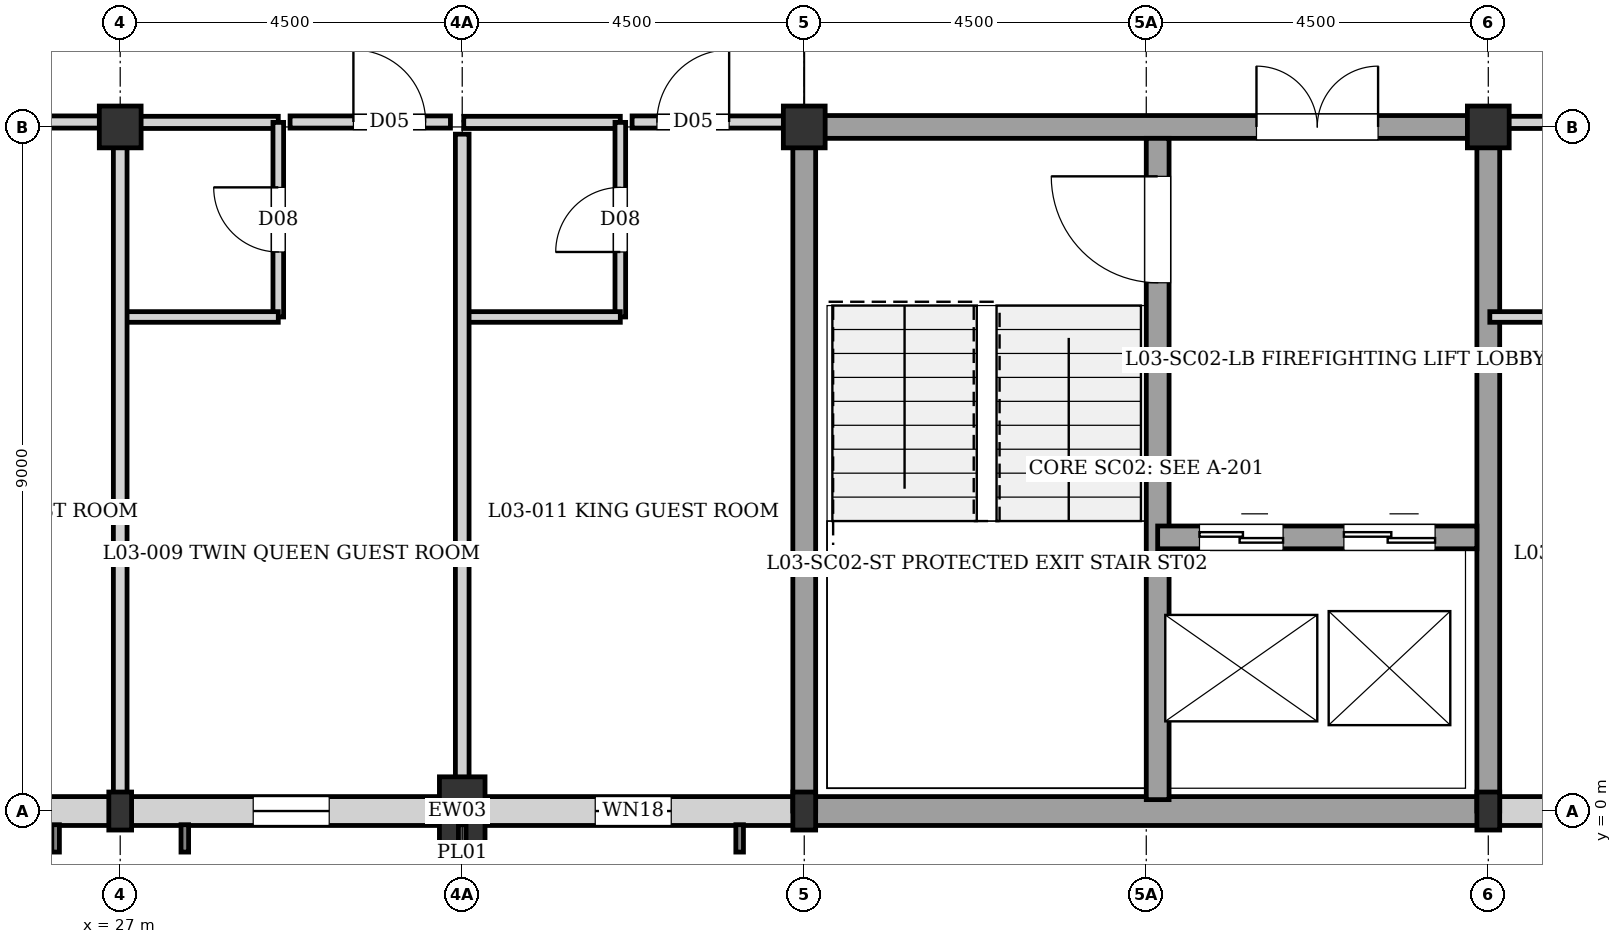
"""IFC4 building model, lengths in metres.
Left out: names, types, materials, properties, quantities, classifications, styles, units other than length and angle.
Written with IfcOpenShell. Run it as: python <this file> out.ifc"""

import sys

from ifc_helpers import new_model, si_unit, direction, frame, frame_2d, origin, origin_2d, place, context, subcontext, project, spatial, rectangle, i_section, extrude, element, fill, save


model = new_model("IFC4")
c1 = context("Model", 3, precision=1e-05, world=origin(), true_north=direction((0.0, 1.0)))
c2 = subcontext(c1, "Body", "Model", "MODEL_VIEW")
j1 = project(units=[si_unit("LENGTHUNIT", "METRE"), si_unit("PLANEANGLEUNIT", "RADIAN")], contexts=[c1])
p1 = place(None, origin())
s1 = spatial("IfcSite", under=j1, at=p1, CompositionType="ELEMENT")
p2 = place(p1, origin())
s2 = spatial("IfcBuilding", under=s1, at=p2, CompositionType="ELEMENT")
p3 = place(p2, frame((0.0, 0.0, 11.52)))
s3 = spatial("IfcBuildingStorey", under=s2, at=p3, CompositionType="ELEMENT", Elevation=11.52)
p4 = place(p3, frame((27.0, 0.0, 0.0), z_axis=(0.0, 0.0, 1.0), x_axis=(1.0, 0.0, 0.0)))
e1 = element("IfcColumn", 1, at=p4, inside=s3, PredefinedType="COLUMN", context=c2, shape_type="SweptSolid", body=[
    extrude(i_section(OverallWidth=0.3, OverallDepth=0.5, WebThickness=0.014, FlangeThickness=0.028, at=origin_2d()), origin(), (0.0, 0.0, 1.0), 3.04),
])
p5 = place(p3, frame((27.0, 9.0, 0.0), z_axis=(0.0, 0.0, 1.0), x_axis=(1.0, 0.0, 0.0)))
e2 = element("IfcColumn", 2, at=p5, inside=s3, PredefinedType="COLUMN", context=c2, shape_type="SweptSolid", body=[
    extrude(rectangle(XDim=0.55, YDim=0.55, at=origin_2d()), origin(), (0.0, 0.0, 1.0), 3.04),
])
p6 = place(p3, frame((36.0, 0.0, 0.0), z_axis=(0.0, 0.0, 1.0), x_axis=(1.0, 0.0, 0.0)))
e3 = element("IfcColumn", 3, at=p6, inside=s3, PredefinedType="COLUMN", context=c2, shape_type="SweptSolid", body=[
    extrude(i_section(OverallWidth=0.3, OverallDepth=0.5, WebThickness=0.014, FlangeThickness=0.028, at=origin_2d()), origin(), (0.0, 0.0, 1.0), 3.04),
])
p7 = place(p3, frame((36.0, 9.0, 0.0), z_axis=(0.0, 0.0, 1.0), x_axis=(1.0, 0.0, 0.0)))
e4 = element("IfcColumn", 4, at=p7, inside=s3, PredefinedType="COLUMN", context=c2, shape_type="SweptSolid", body=[
    extrude(rectangle(XDim=0.55, YDim=0.55, at=origin_2d()), origin(), (0.0, 0.0, 1.0), 3.04),
])
p8 = place(p3, frame((45.0, 0.0, 0.0), z_axis=(0.0, 0.0, 1.0), x_axis=(1.0, 0.0, 0.0)))
e5 = element("IfcColumn", 5, at=p8, inside=s3, PredefinedType="COLUMN", context=c2, shape_type="SweptSolid", body=[
    extrude(i_section(OverallWidth=0.3, OverallDepth=0.5, WebThickness=0.014, FlangeThickness=0.028, at=origin_2d()), origin(), (0.0, 0.0, 1.0), 3.04),
])
p9 = place(p3, frame((45.0, 9.0, 0.0), z_axis=(0.0, 0.0, 1.0), x_axis=(1.0, 0.0, 0.0)))
e6 = element("IfcColumn", 6, at=p9, inside=s3, PredefinedType="COLUMN", context=c2, shape_type="SweptSolid", body=[
    extrude(rectangle(XDim=0.55, YDim=0.55, at=origin_2d()), origin(), (0.0, 0.0, 1.0), 3.04),
])
p10 = place(p3, frame((31.5, 0.0, 0.0), z_axis=(0.0, 0.0, 1.0), x_axis=(1.0, 0.0, 0.0)))
e7 = element("IfcColumn", 7, at=p10, inside=s3, PredefinedType="PILASTER", context=c2, shape_type="SweptSolid", body=[
    extrude(rectangle(XDim=0.6, YDim=0.9, at=origin_2d()), origin(), (0.0, 0.0, 1.0), 3.04),
])
p11 = place(p3, frame((53.87, 0.0, 0.0), z_axis=(0.0, 0.0, 1.0), x_axis=(-1.0, 0.0, 0.0)))
e8 = element("IfcWall", 8, at=p11, inside=s3, PredefinedType="SOLIDWALL", context=c2, shape_type="SweptSolid", body=[
    extrude(rectangle(XDim=8.74, YDim=0.38, at=frame_2d((4.37, 0.0))), origin(), (0.0, 0.0, 1.0), 2.42),
])
p12 = place(p11, frame((1.62, 0.0, 0.35)))
e9 = element("IfcOpeningElement", 9, at=p12, cuts=e8, PredefinedType="OPENING", context=c2, shape_type="SweptSolid", body=[
    extrude(rectangle(XDim=1.0, YDim=1.6, at=frame_2d((0.5, 0.8))), frame((0.0, 0.2, 0.0), z_axis=(0.0, -1.0, 0.0), x_axis=(1.0, 0.0, 0.0)), (0.0, 0.0, 1.0), 0.4),
])
p13 = place(p11, frame((6.12, 0.0, 0.35)))
e10 = element("IfcOpeningElement", 10, at=p13, cuts=e8, PredefinedType="OPENING", context=c2, shape_type="SweptSolid", body=[
    extrude(rectangle(XDim=1.0, YDim=1.6, at=frame_2d((0.5, 0.8))), frame((0.0, 0.2, 0.0), z_axis=(0.0, -1.0, 0.0), x_axis=(1.0, 0.0, 0.0)), (0.0, 0.0, 1.0), 0.4),
])
p14 = place(p3, frame((45.0, 0.0, 0.0), z_axis=(0.0, 0.0, 1.0), x_axis=(-1.0, 0.0, 0.0)))
e11 = element("IfcWall", 11, at=p14, inside=s3, PredefinedType="SOLIDWALL", context=c2, shape_type="SweptSolid", body=[
    extrude(rectangle(XDim=9.0, YDim=0.38, at=frame_2d((4.5, 0.0))), origin(), (0.0, 0.0, 1.0), 2.82),
])
p15 = place(p3, frame((35.87, 0.0, 0.0), z_axis=(0.0, 0.0, 1.0), x_axis=(-1.0, 0.0, 0.0)))
e12 = element("IfcWall", 12, at=p15, inside=s3, PredefinedType="SOLIDWALL", context=c2, shape_type="SweptSolid", body=[
    extrude(rectangle(XDim=8.87, YDim=0.38, at=frame_2d((4.435, 0.0))), origin(), (0.0, 0.0, 1.0), 2.55),
])
p16 = place(p15, frame((1.62, 0.0, 0.35)))
e13 = element("IfcOpeningElement", 13, at=p16, cuts=e12, PredefinedType="OPENING", context=c2, shape_type="SweptSolid", body=[
    extrude(rectangle(XDim=1.0, YDim=1.6, at=frame_2d((0.5, 0.8))), frame((0.0, 0.2, 0.0), z_axis=(0.0, -1.0, 0.0), x_axis=(1.0, 0.0, 0.0)), (0.0, 0.0, 1.0), 0.4),
])
p17 = place(p15, frame((6.12, 0.0, 0.35)))
e14 = element("IfcOpeningElement", 14, at=p17, cuts=e12, PredefinedType="OPENING", context=c2, shape_type="SweptSolid", body=[
    extrude(rectangle(XDim=1.0, YDim=1.6, at=frame_2d((0.5, 0.8))), frame((0.0, 0.2, 0.0), z_axis=(0.0, -1.0, 0.0), x_axis=(1.0, 0.0, 0.0)), (0.0, 0.0, 1.0), 0.4),
])
p18 = place(p3, frame((27.0, 0.0, 0.0), z_axis=(0.0, 0.0, 1.0), x_axis=(-1.0, 0.0, 0.0)))
e15 = element("IfcWall", 15, at=p18, inside=s3, PredefinedType="SOLIDWALL", context=c2, shape_type="SweptSolid", body=[
    extrude(rectangle(XDim=8.87, YDim=0.38, at=frame_2d((4.435, 0.0))), origin(), (0.0, 0.0, 1.0), 2.38),
])
p19 = place(p18, frame((1.75, 0.0, 0.35)))
e16 = element("IfcOpeningElement", 16, at=p19, cuts=e15, PredefinedType="OPENING", context=c2, shape_type="SweptSolid", body=[
    extrude(rectangle(XDim=1.0, YDim=1.6, at=frame_2d((0.5, 0.8))), frame((0.0, 0.2, 0.0), z_axis=(0.0, -1.0, 0.0), x_axis=(1.0, 0.0, 0.0)), (0.0, 0.0, 1.0), 0.4),
])
p20 = place(p18, frame((6.25, 0.0, 0.35)))
e17 = element("IfcOpeningElement", 17, at=p20, cuts=e15, PredefinedType="OPENING", context=c2, shape_type="SweptSolid", body=[
    extrude(rectangle(XDim=1.0, YDim=1.6, at=frame_2d((0.5, 0.8))), frame((0.0, 0.2, 0.0), z_axis=(0.0, -1.0, 0.0), x_axis=(1.0, 0.0, 0.0)), (0.0, 0.0, 1.0), 0.4),
])
p21 = place(p3, frame((45.0, 0.0, 0.0), z_axis=(0.0, 0.0, 1.0), x_axis=(0.0, 1.0, 0.0)))
e18 = element("IfcWall", 18, at=p21, inside=s3, PredefinedType="SHEAR", context=c2, shape_type="SweptSolid", body=[
    extrude(rectangle(XDim=9.0, YDim=0.3, at=frame_2d((4.5, 0.0))), origin(), (0.0, 0.0, 1.0), 2.82),
])
p22 = place(p3, frame((36.0, 9.0, 0.0), z_axis=(0.0, 0.0, 1.0), x_axis=(1.0, 0.0, 0.0)))
e19 = element("IfcWall", 19, at=p22, inside=s3, PredefinedType="SHEAR", context=c2, shape_type="SweptSolid", body=[
    extrude(rectangle(XDim=9.0, YDim=0.3, at=frame_2d((4.5, 0.0))), origin(), (0.0, 0.0, 1.0), 2.82),
])
p23 = place(p22, frame((5.95, 0.0, 0.0)))
e20 = element("IfcOpeningElement", 20, at=p23, cuts=e19, PredefinedType="OPENING", context=c2, shape_type="SweptSolid", body=[
    extrude(rectangle(XDim=1.6, YDim=2.1, at=frame_2d((0.8, 1.05))), frame((0.0, 0.16, 0.0), z_axis=(0.0, -1.0, 0.0), x_axis=(1.0, 0.0, 0.0)), (0.0, 0.0, 1.0), 0.32),
])
p24 = place(p3, frame((36.0, 0.0, 0.0), z_axis=(0.0, 0.0, 1.0), x_axis=(0.0, 1.0, 0.0)))
e21 = element("IfcWall", 21, at=p24, inside=s3, PredefinedType="SHEAR", context=c2, shape_type="SweptSolid", body=[
    extrude(rectangle(XDim=9.0, YDim=0.3, at=frame_2d((4.5, 0.0))), origin(), (0.0, 0.0, 1.0), 2.82),
])
p25 = place(p3, frame((40.65, 0.15, 0.0), z_axis=(0.0, 0.0, 1.0), x_axis=(0.0, 1.0, 0.0)))
e22 = element("IfcWall", 22, at=p25, inside=s3, PredefinedType="SHEAR", context=c2, shape_type="SweptSolid", body=[
    extrude(rectangle(XDim=8.7, YDim=0.3, at=frame_2d((4.35, 0.0))), origin(), (0.0, 0.0, 1.0), 2.82),
])
p26 = place(p25, frame((6.8, 0.0, 0.0)))
e23 = element("IfcOpeningElement", 23, at=p26, cuts=e22, PredefinedType="OPENING", context=c2, shape_type="SweptSolid", body=[
    extrude(rectangle(XDim=1.4, YDim=2.02, at=frame_2d((0.7, 1.01))), frame((0.0, 0.16, 0.0), z_axis=(0.0, -1.0, 0.0), x_axis=(1.0, 0.0, 0.0)), (0.0, 0.0, 1.0), 0.32),
])
p27 = place(p3, frame((40.65, 3.6, 0.0), z_axis=(0.0, 0.0, 1.0), x_axis=(1.0, 0.0, 0.0)))
e24 = element("IfcWall", 24, at=p27, inside=s3, PredefinedType="SHEAR", context=c2, shape_type="SweptSolid", body=[
    extrude(rectangle(XDim=4.2, YDim=0.3, at=frame_2d((2.1, 0.0))), origin(), (0.0, 0.0, 1.0), 2.82),
])
p28 = place(p27, frame((0.55, 0.0, 0.0)))
e25 = element("IfcOpeningElement", 25, at=p28, cuts=e24, PredefinedType="OPENING", context=c2, shape_type="SweptSolid", body=[
    extrude(rectangle(XDim=1.1, YDim=2.1, at=frame_2d((0.55, 1.05))), frame((0.0, 0.16, 0.0), z_axis=(0.0, -1.0, 0.0), x_axis=(1.0, 0.0, 0.0)), (0.0, 0.0, 1.0), 0.32),
])
p29 = place(p27, frame((2.45, 0.0, 0.0)))
e26 = element("IfcOpeningElement", 26, at=p29, cuts=e24, PredefinedType="OPENING", context=c2, shape_type="SweptSolid", body=[
    extrude(rectangle(XDim=1.2, YDim=2.2, at=frame_2d((0.6, 1.1))), frame((0.0, 0.16, 0.0), z_axis=(0.0, -1.0, 0.0), x_axis=(1.0, 0.0, 0.0)), (0.0, 0.0, 1.0), 0.32),
])
p30 = place(p3, frame((27.02, 9.06, 0.0), z_axis=(0.0, 0.0, 1.0), x_axis=(1.0, 0.0, 0.0)))
e27 = element("IfcWall", 27, at=p30, inside=s3, PredefinedType="PARTITIONING", context=c2, shape_type="SweptSolid", body=[
    extrude(rectangle(XDim=2.06, YDim=0.16, at=frame_2d((1.03, 0.0))), origin(), (0.0, 0.0, 1.0), 2.39),
])
p31 = place(p3, frame((29.08, 6.5, 0.0), z_axis=(0.0, 0.0, 1.0), x_axis=(0.0, 1.0, 0.0)))
e28 = element("IfcWall", 28, at=p31, inside=s3, PredefinedType="PLUMBINGWALL", context=c2, shape_type="SweptSolid", body=[
    extrude(rectangle(XDim=2.56, YDim=0.14, at=frame_2d((1.28, 0.0))), origin(), (0.0, 0.0, 1.0), 2.82),
])
p32 = place(p31, frame((0.855, 0.0, 0.0)))
e29 = element("IfcOpeningElement", 29, at=p32, cuts=e28, PredefinedType="OPENING", context=c2, shape_type="SweptSolid", body=[
    extrude(rectangle(XDim=0.85, YDim=2.04, at=frame_2d((0.425, 1.02))), frame((0.0, 0.08, 0.0), z_axis=(0.0, -1.0, 0.0), x_axis=(1.0, 0.0, 0.0)), (0.0, 0.0, 1.0), 0.16),
])
p33 = place(p3, frame((27.02, 6.5, 0.0), z_axis=(0.0, 0.0, 1.0), x_axis=(1.0, 0.0, 0.0)))
e30 = element("IfcWall", 30, at=p33, inside=s3, PredefinedType="PLUMBINGWALL", context=c2, shape_type="SweptSolid", body=[
    extrude(rectangle(XDim=2.06, YDim=0.14, at=frame_2d((1.03, 0.0))), origin(), (0.0, 0.0, 1.0), 2.82),
])
p34 = place(p3, frame((31.52, 9.06, 0.0), z_axis=(0.0, 0.0, 1.0), x_axis=(1.0, 0.0, 0.0)))
e31 = element("IfcWall", 31, at=p34, inside=s3, PredefinedType="PARTITIONING", context=c2, shape_type="SweptSolid", body=[
    extrude(rectangle(XDim=2.06, YDim=0.16, at=frame_2d((1.03, 0.0))), origin(), (0.0, 0.0, 1.0), 2.39),
])
p35 = place(p3, frame((33.58, 6.5, 0.0), z_axis=(0.0, 0.0, 1.0), x_axis=(0.0, 1.0, 0.0)))
e32 = element("IfcWall", 32, at=p35, inside=s3, PredefinedType="PLUMBINGWALL", context=c2, shape_type="SweptSolid", body=[
    extrude(rectangle(XDim=2.56, YDim=0.14, at=frame_2d((1.28, 0.0))), origin(), (0.0, 0.0, 1.0), 2.82),
])
p36 = place(p35, frame((0.855, 0.0, 0.0)))
e33 = element("IfcOpeningElement", 33, at=p36, cuts=e32, PredefinedType="OPENING", context=c2, shape_type="SweptSolid", body=[
    extrude(rectangle(XDim=0.85, YDim=2.04, at=frame_2d((0.425, 1.02))), frame((0.0, 0.08, 0.0), z_axis=(0.0, -1.0, 0.0), x_axis=(1.0, 0.0, 0.0)), (0.0, 0.0, 1.0), 0.16),
])
p37 = place(p3, frame((31.52, 6.5, 0.0), z_axis=(0.0, 0.0, 1.0), x_axis=(1.0, 0.0, 0.0)))
e34 = element("IfcWall", 34, at=p37, inside=s3, PredefinedType="PLUMBINGWALL", context=c2, shape_type="SweptSolid", body=[
    extrude(rectangle(XDim=2.06, YDim=0.14, at=frame_2d((1.03, 0.0))), origin(), (0.0, 0.0, 1.0), 2.82),
])
p38 = place(p3, frame((45.02, 9.06, 0.0), z_axis=(0.0, 0.0, 1.0), x_axis=(1.0, 0.0, 0.0)))
e35 = element("IfcWall", 35, at=p38, inside=s3, PredefinedType="PARTITIONING", context=c2, shape_type="SweptSolid", body=[
    extrude(rectangle(XDim=2.06, YDim=0.16, at=frame_2d((1.03, 0.0))), origin(), (0.0, 0.0, 1.0), 2.29),
])
p39 = place(p3, frame((45.02, 6.5, 0.0), z_axis=(0.0, 0.0, 1.0), x_axis=(1.0, 0.0, 0.0)))
e36 = element("IfcWall", 36, at=p39, inside=s3, PredefinedType="PLUMBINGWALL", context=c2, shape_type="SweptSolid", body=[
    extrude(rectangle(XDim=2.06, YDim=0.14, at=frame_2d((1.03, 0.0))), origin(), (0.0, 0.0, 1.0), 2.82),
])
p40 = place(p3, frame((27.0, 0.195, 0.0), z_axis=(0.0, 0.0, 1.0), x_axis=(0.0, 1.0, 0.0)))
e37 = element("IfcWall", 37, at=p40, inside=s3, PredefinedType="PARTITIONING", context=c2, shape_type="SweptSolid", body=[
    extrude(rectangle(XDim=8.71, YDim=0.18, at=frame_2d((4.355, 0.0))), origin(), (0.0, 0.0, 1.0), 2.45),
])
p41 = place(p3, frame((31.5, 0.195, 0.0), z_axis=(0.0, 0.0, 1.0), x_axis=(0.0, 1.0, 0.0)))
e38 = element("IfcWall", 38, at=p41, inside=s3, PredefinedType="PARTITIONING", context=c2, shape_type="SweptSolid", body=[
    extrude(rectangle(XDim=8.71, YDim=0.18, at=frame_2d((4.355, 0.0))), origin(), (0.0, 0.0, 1.0), 2.82),
])
p42 = place(p3, frame((24.735, 9.065, 0.0), z_axis=(0.0, 0.0, 1.0), x_axis=(1.0, 0.0, 0.0)))
e39 = element("IfcWall", 39, at=p42, inside=s3, PredefinedType="PARTITIONING", context=c2, shape_type="SweptSolid", body=[
    extrude(rectangle(XDim=2.11, YDim=0.16, at=frame_2d((1.055, 0.0))), origin(), (0.0, 0.0, 1.0), 2.45),
])
p43 = place(p42, frame((0.327, 0.0, 0.0)))
e40 = element("IfcOpeningElement", 40, at=p43, cuts=e39, PredefinedType="OPENING", context=c2, shape_type="SweptSolid", body=[
    extrude(rectangle(XDim=0.95, YDim=2.15, at=frame_2d((0.475, 1.075))), frame((0.0, 0.09, 0.0), z_axis=(0.0, -1.0, 0.0), x_axis=(1.0, 0.0, 0.0)), (0.0, 0.0, 1.0), 0.18),
])
p44 = place(p3, frame((29.235, 9.065, 0.0), z_axis=(0.0, 0.0, 1.0), x_axis=(1.0, 0.0, 0.0)))
e41 = element("IfcWall", 41, at=p44, inside=s3, PredefinedType="PARTITIONING", context=c2, shape_type="SweptSolid", body=[
    extrude(rectangle(XDim=2.11, YDim=0.16, at=frame_2d((1.055, 0.0))), origin(), (0.0, 0.0, 1.0), 2.39),
])
p45 = place(p44, frame((0.833, 0.0, 0.0)))
e42 = element("IfcOpeningElement", 42, at=p45, cuts=e41, PredefinedType="OPENING", context=c2, shape_type="SweptSolid", body=[
    extrude(rectangle(XDim=0.95, YDim=2.15, at=frame_2d((0.475, 1.075))), frame((0.0, 0.09, 0.0), z_axis=(0.0, -1.0, 0.0), x_axis=(1.0, 0.0, 0.0)), (0.0, 0.0, 1.0), 0.18),
])
p46 = place(p3, frame((33.735, 9.065, 0.0), z_axis=(0.0, 0.0, 1.0), x_axis=(1.0, 0.0, 0.0)))
e43 = element("IfcWall", 43, at=p46, inside=s3, PredefinedType="PARTITIONING", context=c2, shape_type="SweptSolid", body=[
    extrude(rectangle(XDim=2.11, YDim=0.16, at=frame_2d((1.055, 0.0))), origin(), (0.0, 0.0, 1.0), 2.39),
])
p47 = place(p46, frame((0.327, 0.0, 0.0)))
e44 = element("IfcOpeningElement", 44, at=p47, cuts=e43, PredefinedType="OPENING", context=c2, shape_type="SweptSolid", body=[
    extrude(rectangle(XDim=0.95, YDim=2.15, at=frame_2d((0.475, 1.075))), frame((0.0, 0.09, 0.0), z_axis=(0.0, -1.0, 0.0), x_axis=(1.0, 0.0, 0.0)), (0.0, 0.0, 1.0), 0.18),
])
p48 = place(p16, origin())
e45 = element("IfcWindow", 45, at=p48, inside=s3, PartitioningType="SINGLE_PANEL", PredefinedType="WINDOW", context=c2, shape_type="SweptSolid", body=[
    extrude(rectangle(XDim=1.0, YDim=1.6, at=frame_2d((0.5, 0.8))), frame((0.0, 0.03, 0.0), z_axis=(0.0, -1.0, 0.0), x_axis=(1.0, 0.0, 0.0)), (0.0, 0.0, 1.0), 0.06),
])
fill(e13, e45)
p49 = place(p17, origin())
e46 = element("IfcWindow", 46, at=p49, inside=s3, PartitioningType="SINGLE_PANEL", PredefinedType="WINDOW", context=c2, shape_type="SweptSolid", body=[
    extrude(rectangle(XDim=1.0, YDim=1.6, at=frame_2d((0.5, 0.8))), frame((0.0, 0.03, 0.0), z_axis=(0.0, -1.0, 0.0), x_axis=(1.0, 0.0, 0.0)), (0.0, 0.0, 1.0), 0.06),
])
fill(e14, e46)
p50 = place(p23, origin())
e47 = element("IfcDoor", 47, at=p50, inside=s3, OperationType="DOUBLE_DOOR_SINGLE_SWING", PredefinedType="DOOR", context=c2, shape_type="SweptSolid", body=[
    extrude(rectangle(XDim=1.6, YDim=2.1, at=frame_2d((0.8, 1.05))), frame((0.0, 0.025, 0.0), z_axis=(0.0, -1.0, 0.0), x_axis=(1.0, 0.0, 0.0)), (0.0, 0.0, 1.0), 0.05),
])
fill(e20, e47)
p51 = place(p26, origin())
e48 = element("IfcDoor", 48, at=p51, inside=s3, OperationType="SINGLE_SWING_RIGHT", PredefinedType="DOOR", context=c2, shape_type="SweptSolid", body=[
    extrude(rectangle(XDim=1.4, YDim=2.02, at=frame_2d((0.7, 1.01))), frame((0.0, 0.025, 0.0), z_axis=(0.0, -1.0, 0.0), x_axis=(1.0, 0.0, 0.0)), (0.0, 0.0, 1.0), 0.05),
])
fill(e23, e48)
p52 = place(p28, origin())
e49 = element("IfcDoor", 49, at=p52, inside=s3, OperationType="DOUBLE_DOOR_SLIDING", PredefinedType="DOOR", context=c2, shape_type="SweptSolid", body=[
    extrude(rectangle(XDim=1.1, YDim=2.1, at=frame_2d((0.55, 1.05))), frame((0.0, 0.025, 0.0), z_axis=(0.0, -1.0, 0.0), x_axis=(1.0, 0.0, 0.0)), (0.0, 0.0, 1.0), 0.05),
])
fill(e25, e49)
p53 = place(p29, origin())
e50 = element("IfcDoor", 50, at=p53, inside=s3, OperationType="DOUBLE_DOOR_SLIDING", PredefinedType="DOOR", context=c2, shape_type="SweptSolid", body=[
    extrude(rectangle(XDim=1.2, YDim=2.2, at=frame_2d((0.6, 1.1))), frame((0.0, 0.025, 0.0), z_axis=(0.0, -1.0, 0.0), x_axis=(1.0, 0.0, 0.0)), (0.0, 0.0, 1.0), 0.05),
])
fill(e26, e50)
p54 = place(p32, origin())
e51 = element("IfcDoor", 51, at=p54, inside=s3, OperationType="SINGLE_SWING_RIGHT", PredefinedType="DOOR", context=c2, shape_type="SweptSolid", body=[
    extrude(rectangle(XDim=0.85, YDim=2.04, at=frame_2d((0.425, 1.02))), frame((0.0, 0.025, 0.0), z_axis=(0.0, -1.0, 0.0), x_axis=(1.0, 0.0, 0.0)), (0.0, 0.0, 1.0), 0.05),
])
fill(e29, e51)
p55 = place(p36, origin())
e52 = element("IfcDoor", 52, at=p55, inside=s3, OperationType="SINGLE_SWING_LEFT", PredefinedType="DOOR", context=c2, shape_type="SweptSolid", body=[
    extrude(rectangle(XDim=0.85, YDim=2.04, at=frame_2d((0.425, 1.02))), frame((0.0, 0.025, 0.0), z_axis=(0.0, -1.0, 0.0), x_axis=(1.0, 0.0, 0.0)), (0.0, 0.0, 1.0), 0.05),
])
fill(e33, e52)
p56 = place(p45, origin())
e53 = element("IfcDoor", 53, at=p56, inside=s3, OperationType="SINGLE_SWING_LEFT", PredefinedType="DOOR", context=c2, shape_type="SweptSolid", body=[
    extrude(rectangle(XDim=0.95, YDim=2.15, at=frame_2d((0.475, 1.075))), frame((0.0, 0.025, 0.0), z_axis=(0.0, -1.0, 0.0), x_axis=(1.0, 0.0, 0.0)), (0.0, 0.0, 1.0), 0.05),
])
fill(e42, e53)
p57 = place(p47, origin())
e54 = element("IfcDoor", 54, at=p57, inside=s3, OperationType="SINGLE_SWING_RIGHT", PredefinedType="DOOR", context=c2, shape_type="SweptSolid", body=[
    extrude(rectangle(XDim=0.95, YDim=2.15, at=frame_2d((0.475, 1.075))), frame((0.0, 0.025, 0.0), z_axis=(0.0, -1.0, 0.0), x_axis=(1.0, 0.0, 0.0)), (0.0, 0.0, 1.0), 0.05),
])
fill(e44, e54)
save(model, sys.argv[1])
